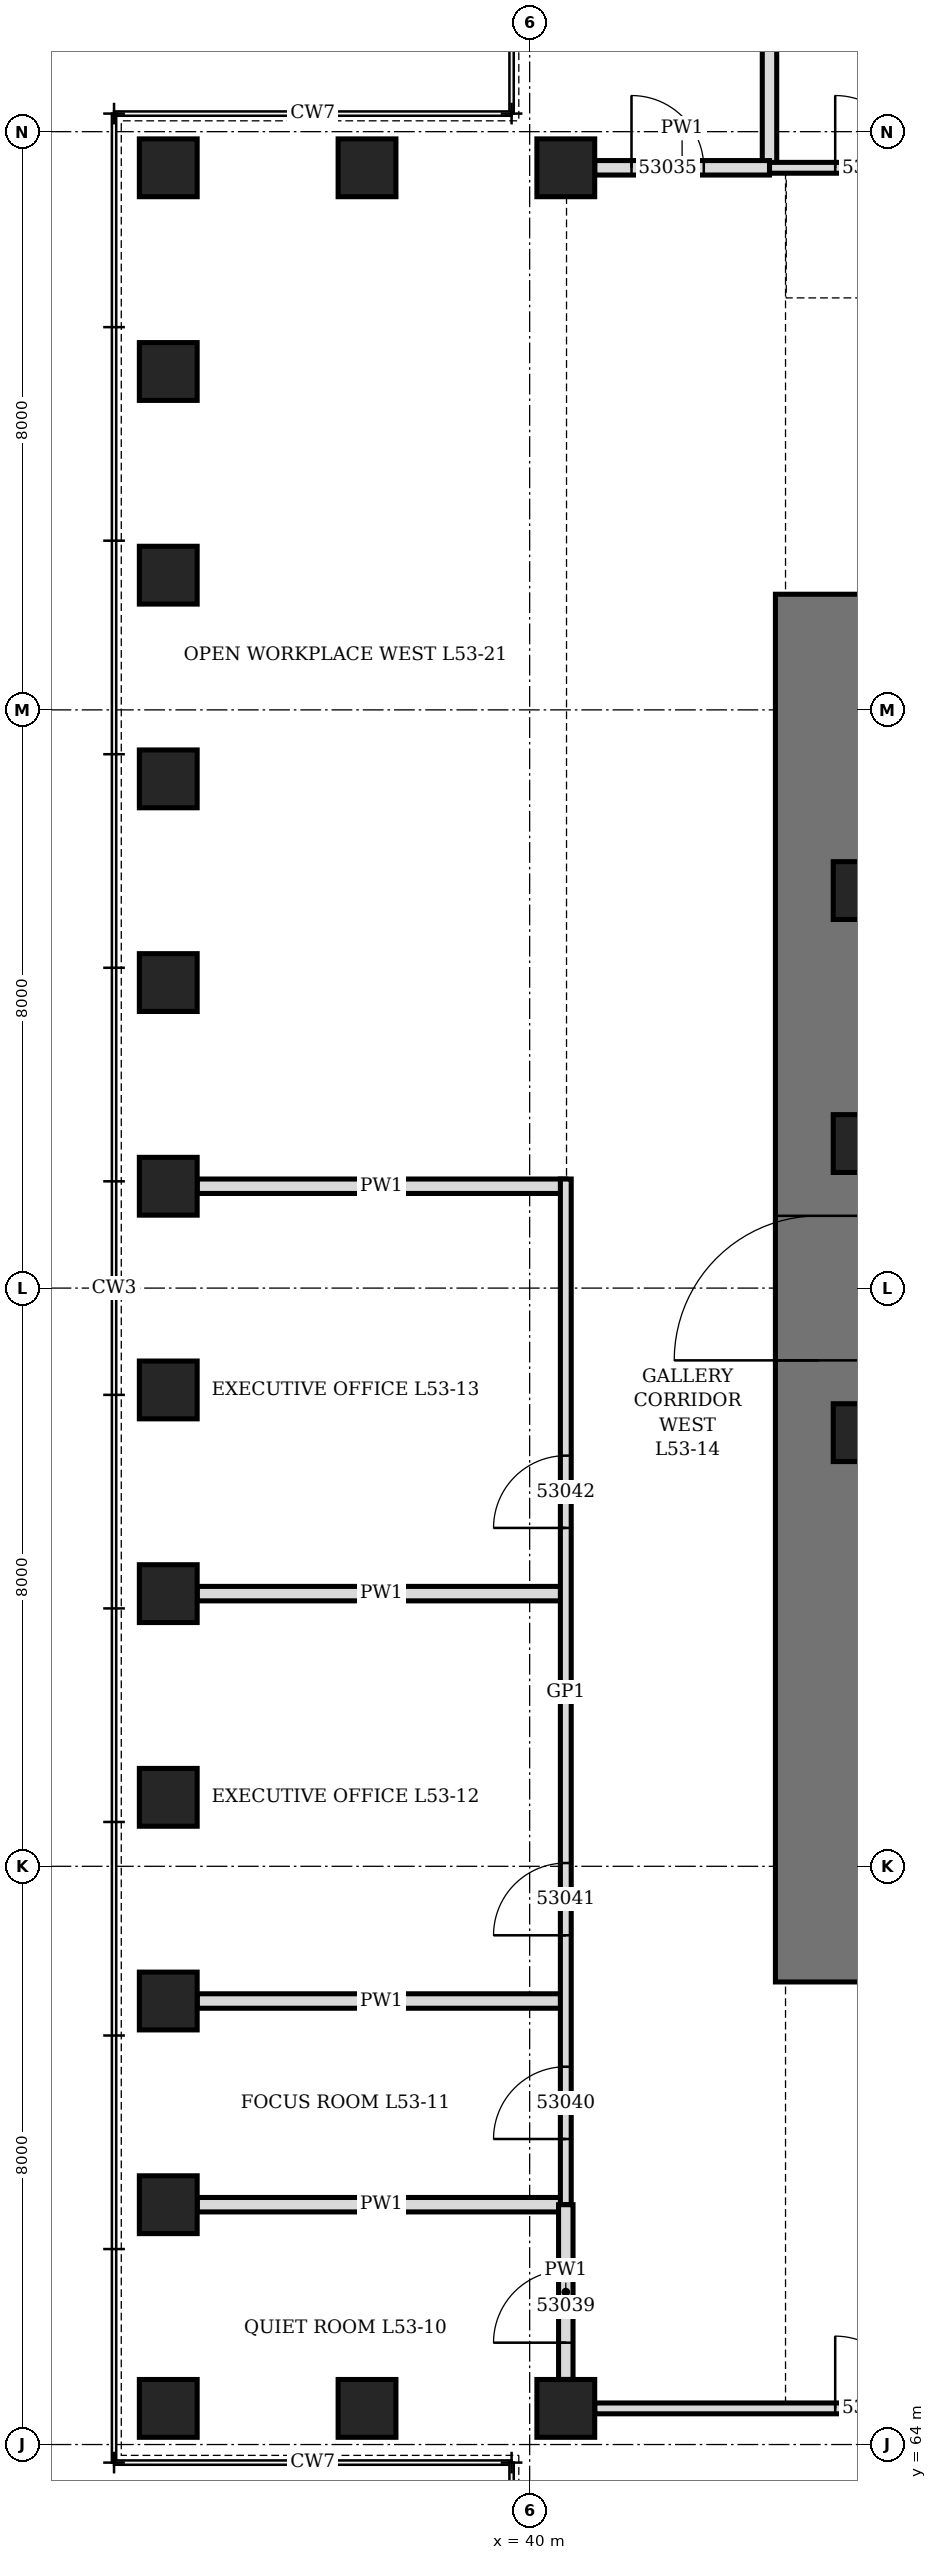
"""IFC4 building model, lengths in metres.
Left out: names, types, materials, properties, quantities, classifications, styles, units other than length and angle.
Written with IfcOpenShell. Run it as: python <this file> out.ifc"""

import sys

from ifc_helpers import new_model, si_unit, direction, frame, frame_2d, origin, origin_2d, place, context, subcontext, project, spatial, rectangle, hollow_rectangle, extrude, element, fill, save


model = new_model("IFC4")
c1 = context("Model", 3, precision=1e-05, world=origin(), true_north=direction((0.0, 1.0)))
c2 = subcontext(c1, "Body", "Model", "MODEL_VIEW")
j1 = project(units=[si_unit("LENGTHUNIT", "METRE"), si_unit("PLANEANGLEUNIT", "RADIAN")], contexts=[c1])
p1 = place(None, origin())
s1 = spatial("IfcSite", under=j1, at=p1, CompositionType="ELEMENT")
p2 = place(p1, origin())
s2 = spatial("IfcBuilding", under=s1, at=p2, CompositionType="ELEMENT")
p3 = place(p2, frame((0.0, 0.0, 235.9)))
s3 = spatial("IfcBuildingStorey", under=s2, at=p3, CompositionType="ELEMENT", Elevation=235.9)
for number, where, z_axis, x_axis in (
    (1, (40.5, 95.5, 0.0), (0.0, 0.0, 1.0), (1.0, 0.0, 0.0)),
    (2, (37.75, 95.5, 0.0), (0.0, 0.0, 1.0), (1.0, 0.0, 0.0)),
    (3, (35.0, 95.5, 0.0), (0.0, 0.0, 1.0), (0.0, 1.0, 0.0)),
    (4, (35.0, 92.682, 0.0), (0.0, 0.0, 1.0), (0.0, 1.0, 0.0)),
    (5, (35.0, 89.864, 0.0), (0.0, 0.0, 1.0), (0.0, 1.0, 0.0)),
    (6, (35.0, 87.045, 0.0), (0.0, 0.0, 1.0), (0.0, 1.0, 0.0)),
    (7, (35.0, 84.227, 0.0), (0.0, 0.0, 1.0), (0.0, 1.0, 0.0)),
    (8, (35.0, 81.409, 0.0), (0.0, 0.0, 1.0), (0.0, 1.0, 0.0)),
    (9, (35.0, 78.591, 0.0), (0.0, 0.0, 1.0), (0.0, 1.0, 0.0)),
    (10, (35.0, 75.773, 0.0), (0.0, 0.0, 1.0), (0.0, 1.0, 0.0)),
    (11, (35.0, 72.955, 0.0), (0.0, 0.0, 1.0), (0.0, 1.0, 0.0)),
    (12, (35.0, 70.136, 0.0), (0.0, 0.0, 1.0), (0.0, 1.0, 0.0)),
    (13, (35.0, 67.318, 0.0), (0.0, 0.0, 1.0), (0.0, 1.0, 0.0)),
    (14, (35.0, 64.5, 0.0), (0.0, 0.0, 1.0), (1.0, 0.0, 0.0)),
    (15, (37.75, 64.5, 0.0), (0.0, 0.0, 1.0), (1.0, 0.0, 0.0)),
    (16, (40.5, 64.5, 0.0), (0.0, 0.0, 1.0), (0.0, 1.0, 0.0)),
):
    element("IfcColumn", number, at=place(p3, frame(where, z_axis=z_axis, x_axis=x_axis)), inside=s3, PredefinedType="COLUMN", context=c2, shape_type="SweptSolid", body=[
        extrude(hollow_rectangle(XDim=0.8, YDim=0.8, WallThickness=0.08, at=origin_2d()), origin(), (0.0, 0.0, 1.0), 4.2),
    ])
p4 = place(p3, frame((44.0, 70.4, 0.0), z_axis=(0.0, 0.0, 1.0), x_axis=(0.0, 1.0, 0.0)))
e17 = element("IfcWall", 17, at=p4, inside=s3, PredefinedType="SHEAR", context=c2, shape_type="SweptSolid", body=[
    extrude(rectangle(XDim=19.2, YDim=1.2, at=frame_2d((9.6, 0.0))), origin(), (0.0, 0.0, 1.0), 4.2),
])
p5 = place(p4, frame((8.6, 0.0, 0.0)))
e18 = element("IfcOpeningElement", 18, at=p5, cuts=e17, PredefinedType="OPENING", context=c2, shape_type="SweptSolid", body=[
    extrude(rectangle(XDim=2.0, YDim=2.4, at=frame_2d((1.0, 1.2))), frame((0.0, 0.61, 0.0), z_axis=(0.0, -1.0, 0.0), x_axis=(1.0, 0.0, 0.0)), (0.0, 0.0, 1.0), 1.22),
])
for number, where, z_axis, x_axis in (
    (19, (44.6, 78.0, 0.0), (0.0, 0.0, 1.0), (1.0, 0.0, 0.0)),
    (20, (44.6, 82.0, 0.0), (0.0, 0.0, 1.0), (1.0, 0.0, 0.0)),
    (21, (44.6, 85.5, 0.0), (0.0, 0.0, 1.0), (1.0, 0.0, 0.0)),
):
    element("IfcColumn", number, at=place(p3, frame(where, z_axis=z_axis, x_axis=x_axis)), inside=s3, PredefinedType="COLUMN", context=c2, shape_type="SweptSolid", body=[
        extrude(hollow_rectangle(XDim=0.8, YDim=0.8, WallThickness=0.1, at=origin_2d()), origin(), (0.0, 0.0, 1.0), 4.2),
    ])
for number, where, z_axis, x_axis in (
    (22, (43.318, 95.5, 0.0), (0.0, 0.0, 1.0), (0.0, 1.0, 0.0)),
    (23, (35.4, 67.318, 0.0), (0.0, 0.0, 1.0), (1.0, 0.0, 0.0)),
    (24, (35.4, 70.136, 0.0), (0.0, 0.0, 1.0), (1.0, 0.0, 0.0)),
    (25, (35.4, 75.773, 0.0), (0.0, 0.0, 1.0), (1.0, 0.0, 0.0)),
    (26, (35.4, 81.409, 0.0), (0.0, 0.0, 1.0), (1.0, 0.0, 0.0)),
):
    element("IfcWall", number, at=place(p3, frame(where, z_axis=z_axis, x_axis=x_axis)), inside=s3, PredefinedType="PARTITIONING", context=c2, shape_type="SweptSolid", body=[
        extrude(rectangle(XDim=5.1, YDim=0.2, at=frame_2d((2.55, 0.0))), origin(), (0.0, 0.0, 1.0), 3.428),
    ])
p6 = place(p3, frame((40.9, 64.5, 0.0), z_axis=(0.0, 0.0, 1.0), x_axis=(1.0, 0.0, 0.0)))
e27 = element("IfcWall", 27, at=p6, inside=s3, PredefinedType="PARTITIONING", context=c2, shape_type="SweptSolid", body=[
    extrude(rectangle(XDim=8.155, YDim=0.15, at=frame_2d((4.077, 0.0))), origin(), (0.0, 0.0, 1.0), 4.04),
])
p7 = place(p6, frame((3.327, 0.0, 0.0)))
e28 = element("IfcOpeningElement", 28, at=p7, cuts=e27, PredefinedType="OPENING", context=c2, shape_type="SweptSolid", body=[
    extrude(rectangle(XDim=1.0, YDim=2.4, at=frame_2d((0.5, 1.2))), frame((0.0, 0.085, 0.0), z_axis=(0.0, -1.0, 0.0), x_axis=(1.0, 0.0, 0.0)), (0.0, 0.0, 1.0), 0.17),
])
p8 = place(p3, frame((43.318, 95.5, 0.0), z_axis=(0.0, 0.0, 1.0), x_axis=(1.0, 0.0, 0.0)))
e29 = element("IfcWall", 29, at=p8, inside=s3, PredefinedType="PARTITIONING", context=c2, shape_type="SweptSolid", body=[
    extrude(rectangle(XDim=8.555, YDim=0.15, at=frame_2d((4.277, 0.0))), origin(), (0.0, 0.0, 1.0), 4.04),
])
p9 = place(p8, frame((0.909, 0.0, 0.0)))
e30 = element("IfcOpeningElement", 30, at=p9, cuts=e29, PredefinedType="OPENING", context=c2, shape_type="SweptSolid", body=[
    extrude(rectangle(XDim=1.0, YDim=2.4, at=frame_2d((0.5, 1.2))), frame((0.0, 0.085, 0.0), z_axis=(0.0, -1.0, 0.0), x_axis=(1.0, 0.0, 0.0)), (0.0, 0.0, 1.0), 0.17),
])
p10 = place(p8, frame((3.727, 0.0, 0.0)))
e31 = element("IfcOpeningElement", 31, at=p10, cuts=e29, PredefinedType="OPENING", context=c2, shape_type="SweptSolid", body=[
    extrude(rectangle(XDim=1.0, YDim=2.4, at=frame_2d((0.5, 1.2))), frame((0.0, 0.085, 0.0), z_axis=(0.0, -1.0, 0.0), x_axis=(1.0, 0.0, 0.0)), (0.0, 0.0, 1.0), 0.17),
])
p11 = place(p8, frame((6.545, 0.0, 0.0)))
e32 = element("IfcOpeningElement", 32, at=p11, cuts=e29, PredefinedType="OPENING", context=c2, shape_type="SweptSolid", body=[
    extrude(rectangle(XDim=1.0, YDim=2.4, at=frame_2d((0.5, 1.2))), frame((0.0, 0.085, 0.0), z_axis=(0.0, -1.0, 0.0), x_axis=(1.0, 0.0, 0.0)), (0.0, 0.0, 1.0), 0.17),
])
p12 = place(p3, frame((40.9, 95.5, 0.0), z_axis=(0.0, 0.0, 1.0), x_axis=(1.0, 0.0, 0.0)))
e33 = element("IfcWall", 33, at=p12, inside=s3, PredefinedType="PARTITIONING", context=c2, shape_type="SweptSolid", body=[
    extrude(rectangle(XDim=2.418, YDim=0.2, at=frame_2d((1.209, 0.0))), origin(), (0.0, 0.0, 1.0), 4.04),
])
p13 = place(p12, frame((0.509, 0.0, 0.0)))
e34 = element("IfcOpeningElement", 34, at=p13, cuts=e33, PredefinedType="OPENING", context=c2, shape_type="SweptSolid", body=[
    extrude(rectangle(XDim=1.0, YDim=2.1, at=frame_2d((0.5, 1.05))), frame((0.0, 0.11, 0.0), z_axis=(0.0, -1.0, 0.0), x_axis=(1.0, 0.0, 0.0)), (0.0, 0.0, 1.0), 0.22),
])
p14 = place(p3, frame((40.5, 67.318, 0.0), z_axis=(0.0, 0.0, 1.0), x_axis=(0.0, 1.0, 0.0)))
e35 = element("IfcWall", 35, at=p14, inside=s3, PredefinedType="PARTITIONING", context=c2, shape_type="SweptSolid", body=[
    extrude(rectangle(XDim=14.191, YDim=0.15, at=frame_2d((7.095, 0.0))), origin(), (0.0, 0.0, 1.0), 4.04),
])
p15 = place(p14, frame((0.909, 0.0, 0.0)))
e36 = element("IfcOpeningElement", 36, at=p15, cuts=e35, PredefinedType="OPENING", context=c2, shape_type="SweptSolid", body=[
    extrude(rectangle(XDim=1.0, YDim=2.4, at=frame_2d((0.5, 1.2))), frame((0.0, 0.085, 0.0), z_axis=(0.0, -1.0, 0.0), x_axis=(1.0, 0.0, 0.0)), (0.0, 0.0, 1.0), 0.17),
])
p16 = place(p14, frame((3.727, 0.0, 0.0)))
e37 = element("IfcOpeningElement", 37, at=p16, cuts=e35, PredefinedType="OPENING", context=c2, shape_type="SweptSolid", body=[
    extrude(rectangle(XDim=1.0, YDim=2.1, at=frame_2d((0.5, 1.05))), frame((0.0, 0.085, 0.0), z_axis=(0.0, -1.0, 0.0), x_axis=(1.0, 0.0, 0.0)), (0.0, 0.0, 1.0), 0.17),
])
p17 = place(p14, frame((9.364, 0.0, 0.0)))
e38 = element("IfcOpeningElement", 38, at=p17, cuts=e35, PredefinedType="OPENING", context=c2, shape_type="SweptSolid", body=[
    extrude(rectangle(XDim=1.0, YDim=2.1, at=frame_2d((0.5, 1.05))), frame((0.0, 0.085, 0.0), z_axis=(0.0, -1.0, 0.0), x_axis=(1.0, 0.0, 0.0)), (0.0, 0.0, 1.0), 0.17),
])
p18 = place(p3, frame((40.5, 64.9, 0.0), z_axis=(0.0, 0.0, 1.0), x_axis=(0.0, 1.0, 0.0)))
e39 = element("IfcWall", 39, at=p18, inside=s3, PredefinedType="PARTITIONING", context=c2, shape_type="SweptSolid", body=[
    extrude(rectangle(XDim=2.418, YDim=0.2, at=frame_2d((1.209, 0.0))), origin(), (0.0, 0.0, 1.0), 4.04),
])
p19 = place(p18, frame((0.509, 0.0, 0.0)))
e40 = element("IfcOpeningElement", 40, at=p19, cuts=e39, PredefinedType="OPENING", context=c2, shape_type="SweptSolid", body=[
    extrude(rectangle(XDim=1.0, YDim=2.1, at=frame_2d((0.5, 1.05))), frame((0.0, 0.11, 0.0), z_axis=(0.0, -1.0, 0.0), x_axis=(1.0, 0.0, 0.0)), (0.0, 0.0, 1.0), 0.22),
])
p20 = place(p5, origin())
e41 = element("IfcDoor", 41, at=p20, inside=s3, OperationType="DOUBLE_DOOR_SINGLE_SWING", PredefinedType="DOOR", context=c2, shape_type="SweptSolid", body=[
    extrude(rectangle(XDim=2.0, YDim=2.4, at=frame_2d((1.0, 1.2))), frame((0.0, 0.35, 0.0), z_axis=(0.0, -1.0, 0.0), x_axis=(1.0, 0.0, 0.0)), (0.0, 0.0, 1.0), 0.7),
])
fill(e18, e41)
p21 = place(p7, origin())
e42 = element("IfcDoor", 42, at=p21, inside=s3, OperationType="SINGLE_SWING_RIGHT", PredefinedType="DOOR", context=c2, shape_type="SweptSolid", body=[
    extrude(rectangle(XDim=1.0, YDim=2.4, at=frame_2d((0.5, 1.2))), frame((0.0, 0.075, 0.0), z_axis=(0.0, -1.0, 0.0), x_axis=(1.0, 0.0, 0.0)), (0.0, 0.0, 1.0), 0.149),
])
fill(e28, e42)
p22 = place(p13, origin())
e43 = element("IfcDoor", 43, at=p22, inside=s3, OperationType="SINGLE_SWING_LEFT", PredefinedType="DOOR", context=c2, shape_type="SweptSolid", body=[
    extrude(rectangle(XDim=1.0, YDim=2.1, at=frame_2d((0.5, 1.05))), frame((0.0, 0.1, 0.0), z_axis=(0.0, -1.0, 0.0), x_axis=(1.0, 0.0, 0.0)), (0.0, 0.0, 1.0), 0.199),
])
fill(e34, e43)
p23 = place(p9, origin())
e44 = element("IfcDoor", 44, at=p23, inside=s3, OperationType="SINGLE_SWING_RIGHT", PredefinedType="DOOR", context=c2, shape_type="SweptSolid", body=[
    extrude(rectangle(XDim=1.0, YDim=2.4, at=frame_2d((0.5, 1.2))), frame((0.0, 0.075, 0.0), z_axis=(0.0, -1.0, 0.0), x_axis=(1.0, 0.0, 0.0)), (0.0, 0.0, 1.0), 0.149),
])
fill(e30, e44)
p24 = place(p19, origin())
e45 = element("IfcDoor", 45, at=p24, inside=s3, OperationType="SINGLE_SWING_LEFT", PredefinedType="DOOR", context=c2, shape_type="SweptSolid", body=[
    extrude(rectangle(XDim=1.0, YDim=2.1, at=frame_2d((0.5, 1.05))), frame((0.0, 0.1, 0.0), z_axis=(0.0, -1.0, 0.0), x_axis=(1.0, 0.0, 0.0)), (0.0, 0.0, 1.0), 0.199),
])
fill(e40, e45)
p25 = place(p15, origin())
e46 = element("IfcDoor", 46, at=p25, inside=s3, OperationType="SINGLE_SWING_RIGHT", PredefinedType="DOOR", context=c2, shape_type="SweptSolid", body=[
    extrude(rectangle(XDim=1.0, YDim=2.4, at=frame_2d((0.5, 1.2))), frame((0.0, 0.075, 0.0), z_axis=(0.0, -1.0, 0.0), x_axis=(1.0, 0.0, 0.0)), (0.0, 0.0, 1.0), 0.149),
])
fill(e36, e46)
p26 = place(p16, origin())
e47 = element("IfcDoor", 47, at=p26, inside=s3, OperationType="SINGLE_SWING_LEFT", PredefinedType="DOOR", context=c2, shape_type="SweptSolid", body=[
    extrude(rectangle(XDim=1.0, YDim=2.1, at=frame_2d((0.5, 1.05))), frame((0.0, 0.075, 0.0), z_axis=(0.0, -1.0, 0.0), x_axis=(1.0, 0.0, 0.0)), (0.0, 0.0, 1.0), 0.149),
])
fill(e37, e47)
p27 = place(p17, origin())
e48 = element("IfcDoor", 48, at=p27, inside=s3, OperationType="SINGLE_SWING_LEFT", PredefinedType="DOOR", context=c2, shape_type="SweptSolid", body=[
    extrude(rectangle(XDim=1.0, YDim=2.1, at=frame_2d((0.5, 1.05))), frame((0.0, 0.075, 0.0), z_axis=(0.0, -1.0, 0.0), x_axis=(1.0, 0.0, 0.0)), (0.0, 0.0, 1.0), 0.149),
])
fill(e38, e48)
save(model, sys.argv[1])
